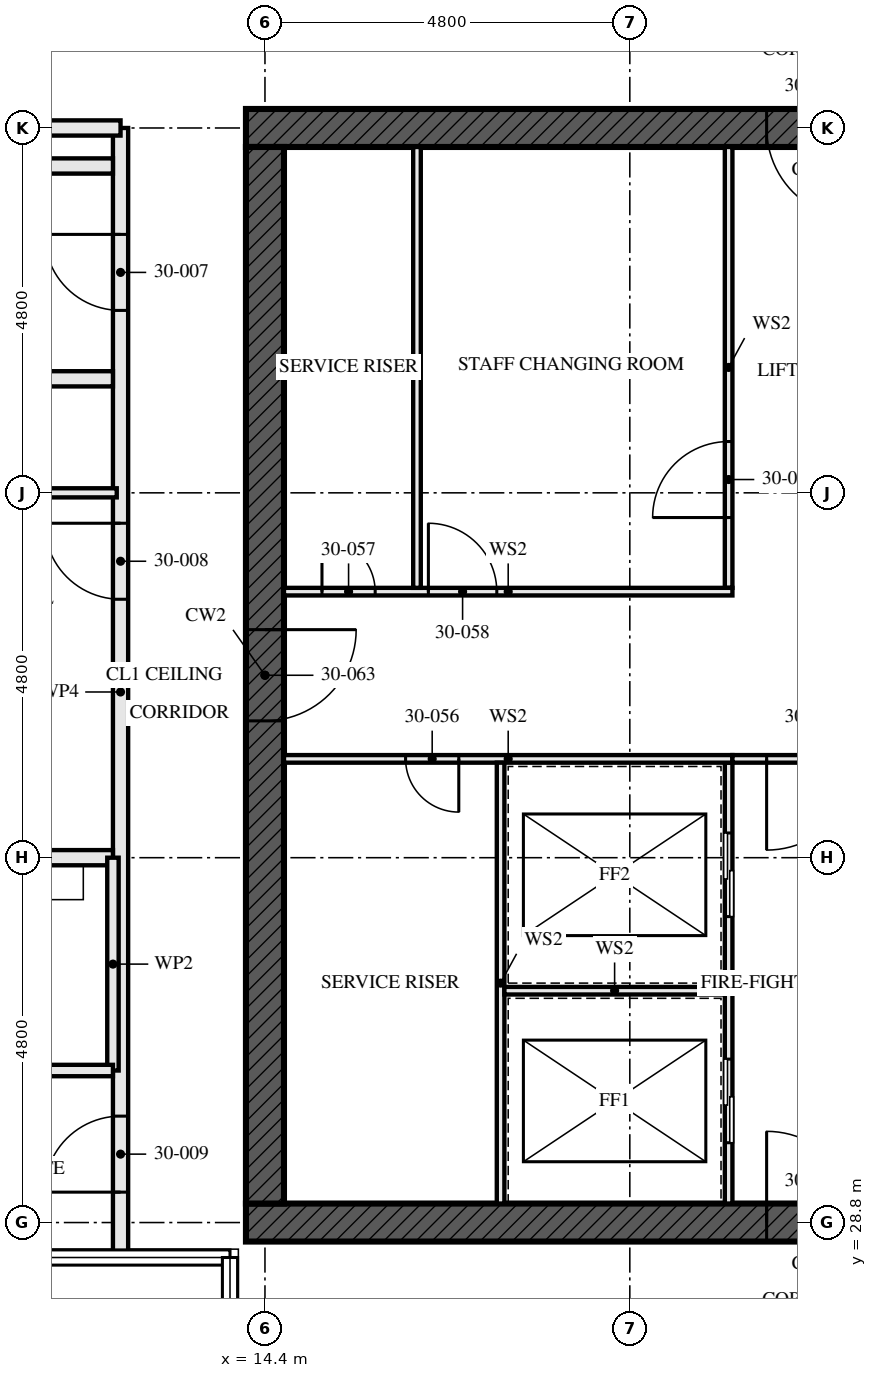
"""IFC4 building model, lengths in metres.
Left out: names, types, materials, properties, quantities, classifications, styles, units other than length and angle.
Written with IfcOpenShell. Run it as: python <this file> out.ifc"""

import sys

from ifc_helpers import new_model, si_unit, direction, frame, frame_2d, origin, place, context, subcontext, project, spatial, rectangle, extrude, element, fill, save


model = new_model("IFC4")
c1 = context("Model", 3, precision=1e-05, world=origin(), true_north=direction((0.0, 1.0)))
c2 = subcontext(c1, "Body", "Model", "MODEL_VIEW")
j1 = project(units=[si_unit("LENGTHUNIT", "METRE"), si_unit("PLANEANGLEUNIT", "RADIAN")], contexts=[c1])
p1 = place(None, origin())
s1 = spatial("IfcSite", under=j1, at=p1, CompositionType="ELEMENT")
p2 = place(p1, origin())
s2 = spatial("IfcBuilding", under=s1, at=p2, CompositionType="ELEMENT")
p3 = place(p2, frame((0.0, 0.0, 112.0)))
s3 = spatial("IfcBuildingStorey", under=s2, at=p3, CompositionType="ELEMENT", Elevation=112.0)
p4 = place(p3, frame((14.15, 28.8, -0.17), z_axis=(0.0, 0.0, 1.0), x_axis=(1.0, 0.0, 0.0)))
e1 = element("IfcWall", 1, at=p4, inside=s3, PredefinedType="SHEAR", context=c2, shape_type="SweptSolid", body=[
    extrude(rectangle(XDim=14.9, YDim=0.5, at=frame_2d((7.45, 0.0))), origin(), (0.0, 0.0, 1.0), 3.5),
])
p5 = place(p4, frame((6.85, 0.0, 0.17)))
e2 = element("IfcOpeningElement", 2, at=p5, cuts=e1, PredefinedType="OPENING", context=c2, shape_type="SweptSolid", body=[
    extrude(rectangle(XDim=1.2, YDim=2.1, at=frame_2d((0.6, 1.05))), frame((0.0, 0.26, 0.0), z_axis=(0.0, -1.0, 0.0), x_axis=(1.0, 0.0, 0.0)), (0.0, 0.0, 1.0), 0.521),
])
p6 = place(p3, frame((29.05, 43.2, -0.17), z_axis=(0.0, 0.0, 1.0), x_axis=(-1.0, 0.0, 0.0)))
e3 = element("IfcWall", 3, at=p6, inside=s3, PredefinedType="SHEAR", context=c2, shape_type="SweptSolid", body=[
    extrude(rectangle(XDim=14.9, YDim=0.5, at=frame_2d((7.45, 0.0))), origin(), (0.0, 0.0, 1.0), 3.5),
])
p7 = place(p6, frame((6.85, 0.0, 0.17)))
e4 = element("IfcOpeningElement", 4, at=p7, cuts=e3, PredefinedType="OPENING", context=c2, shape_type="SweptSolid", body=[
    extrude(rectangle(XDim=1.2, YDim=2.1, at=frame_2d((0.6, 1.05))), frame((0.0, 0.26, 0.0), z_axis=(0.0, -1.0, 0.0), x_axis=(1.0, 0.0, 0.0)), (0.0, 0.0, 1.0), 0.521),
])
p8 = place(p3, frame((14.4, 42.95, -0.17), z_axis=(0.0, 0.0, 1.0), x_axis=(0.0, -1.0, 0.0)))
e5 = element("IfcWall", 5, at=p8, inside=s3, PredefinedType="SHEAR", context=c2, shape_type="SweptSolid", body=[
    extrude(rectangle(XDim=13.9, YDim=0.5, at=frame_2d((6.95, 0.0))), origin(), (0.0, 0.0, 1.0), 3.5),
])
p9 = place(p8, frame((6.35, 0.0, 0.17)))
e6 = element("IfcOpeningElement", 6, at=p9, cuts=e5, PredefinedType="OPENING", context=c2, shape_type="SweptSolid", body=[
    extrude(rectangle(XDim=1.2, YDim=2.1, at=frame_2d((0.6, 1.05))), frame((0.0, 0.26, 0.0), z_axis=(0.0, -1.0, 0.0), x_axis=(1.0, 0.0, 0.0)), (0.0, 0.0, 1.0), 0.521),
])
for number, where, z_axis, x_axis in (
    (7, (7.7, 42.7, 0.0), (0.0, 0.0, 1.0), (1.0, 0.0, 0.0)),
    (8, (7.7, 39.9, 0.0), (0.0, 0.0, 1.0), (1.0, 0.0, 0.0)),
):
    element("IfcWall", number, at=place(p3, frame(where, z_axis=z_axis, x_axis=x_axis)), inside=s3, PredefinedType="SOLIDWALL", context=c2, shape_type="SweptSolid", body=[
        extrude(rectangle(XDim=4.7, YDim=0.2, at=frame_2d((2.35, 0.0))), origin(), (0.0, 0.0, 1.0), 2.99),
    ])
p10 = place(p3, frame((6.4, 38.4, 0.0), z_axis=(0.0, 0.0, 1.0), x_axis=(1.0, 0.0, 0.0)))
e9 = element("IfcWall", 9, at=p10, inside=s3, PredefinedType="PARTITIONING", context=c2, shape_type="SweptSolid", body=[
    extrude(rectangle(XDim=6.05, YDim=0.12, at=frame_2d((3.025, 0.0))), origin(), (0.0, 0.0, 1.0), 2.55),
])
p11 = place(p10, frame((4.05, 0.0, 0.0)))
e10 = element("IfcOpeningElement", 10, at=p11, cuts=e9, PredefinedType="OPENING", context=c2, shape_type="SweptSolid", body=[
    extrude(rectangle(XDim=0.9, YDim=2.1, at=frame_2d((0.45, 1.05))), frame((0.0, 0.071, 0.0), z_axis=(0.0, -1.0, 0.0), x_axis=(1.0, 0.0, 0.0)), (0.0, 0.0, 1.0), 0.141),
])
p12 = place(p3, frame((5.12, 33.6, 0.0), z_axis=(0.0, 0.0, 1.0), x_axis=(1.0, 0.0, 0.0)))
e11 = element("IfcWall", 11, at=p12, inside=s3, PredefinedType="PARTITIONING", context=c2, shape_type="SweptSolid", body=[
    extrude(rectangle(XDim=7.28, YDim=0.2, at=frame_2d((3.64, 0.0))), origin(), (0.0, 0.0, 1.0), 2.55),
])
p13 = place(p3, frame((9.4, 30.8, 0.0), z_axis=(0.0, 0.0, 1.0), x_axis=(1.0, 0.0, 0.0)))
e12 = element("IfcWall", 12, at=p13, inside=s3, PredefinedType="PARTITIONING", context=c2, shape_type="SweptSolid", body=[
    extrude(rectangle(XDim=3.0, YDim=0.15, at=frame_2d((1.5, 0.0))), origin(), (0.0, 0.0, 1.0), 3.33),
])
p14 = place(p3, frame((12.4, 33.6, 0.0), z_axis=(0.0, 0.0, 1.0), x_axis=(0.0, -1.0, 0.0)))
e13 = element("IfcWall", 13, at=p14, inside=s3, PredefinedType="PARTITIONING", context=c2, shape_type="SweptSolid", body=[
    extrude(rectangle(XDim=2.8, YDim=0.15, at=frame_2d((1.4, 0.0))), origin(), (0.0, 0.0, 1.0), 3.33),
])
p15 = place(p3, frame((12.5, 43.2, 0.0), z_axis=(0.0, 0.0, 1.0), x_axis=(0.0, -1.0, 0.0)))
e14 = element("IfcWall", 14, at=p15, inside=s3, PredefinedType="PARTITIONING", context=c2, shape_type="SweptSolid", body=[
    extrude(rectangle(XDim=14.84, YDim=0.2, at=frame_2d((7.42, 0.0))), origin(), (0.0, 0.0, 1.0), 2.32),
])
p16 = place(p15, frame((1.4, 0.0, 0.0)))
e15 = element("IfcOpeningElement", 15, at=p16, cuts=e14, PredefinedType="OPENING", context=c2, shape_type="SweptSolid", body=[
    extrude(rectangle(XDim=1.0, YDim=2.1, at=frame_2d((0.5, 1.05))), frame((0.0, 0.111, 0.0), z_axis=(0.0, -1.0, 0.0), x_axis=(1.0, 0.0, 0.0)), (0.0, 0.0, 1.0), 0.221),
])
p17 = place(p15, frame((5.2, 0.0, 0.0)))
e16 = element("IfcOpeningElement", 16, at=p17, cuts=e14, PredefinedType="OPENING", context=c2, shape_type="SweptSolid", body=[
    extrude(rectangle(XDim=1.0, YDim=2.1, at=frame_2d((0.5, 1.05))), frame((0.0, 0.111, 0.0), z_axis=(0.0, -1.0, 0.0), x_axis=(1.0, 0.0, 0.0)), (0.0, 0.0, 1.0), 0.221),
])
p18 = place(p15, frame((13.0, 0.0, 0.0)))
e17 = element("IfcOpeningElement", 17, at=p18, cuts=e14, PredefinedType="OPENING", context=c2, shape_type="SweptSolid", body=[
    extrude(rectangle(XDim=1.0, YDim=2.1, at=frame_2d((0.5, 1.05))), frame((0.0, 0.111, 0.0), z_axis=(0.0, -1.0, 0.0), x_axis=(1.0, 0.0, 0.0)), (0.0, 0.0, 1.0), 0.221),
])
p19 = place(p3, frame((16.4, 37.15, 0.0), z_axis=(0.0, 0.0, 1.0), x_axis=(0.0, 1.0, 0.0)))
e18 = element("IfcWall", 18, at=p19, inside=s3, PredefinedType="SOLIDWALL", context=c2, shape_type="SweptSolid", body=[
    extrude(rectangle(XDim=5.8, YDim=0.1, at=frame_2d((2.9, 0.0))), origin(), (0.0, 0.0, 1.0), 3.33),
])
p20 = place(p3, frame((20.5, 29.05, 0.0), z_axis=(0.0, 0.0, 1.0), x_axis=(0.0, 1.0, 0.0)))
e19 = element("IfcWall", 19, at=p20, inside=s3, PredefinedType="SOLIDWALL", context=c2, shape_type="SweptSolid", body=[
    extrude(rectangle(XDim=5.8, YDim=0.1, at=frame_2d((2.9, 0.0))), origin(), (0.0, 0.0, 1.0), 3.33),
])
p21 = place(p20, frame((0.8, 0.0, 0.0)))
e20 = element("IfcOpeningElement", 20, at=p21, cuts=e19, PredefinedType="OPENING", context=c2, shape_type="SweptSolid", body=[
    extrude(rectangle(XDim=1.1, YDim=2.3, at=frame_2d((0.55, 1.15))), frame((0.0, 0.061, 0.0), z_axis=(0.0, -1.0, 0.0), x_axis=(1.0, 0.0, 0.0)), (0.0, 0.0, 1.0), 0.121),
])
p22 = place(p20, frame((3.775, 0.0, 0.0)))
e21 = element("IfcOpeningElement", 21, at=p22, cuts=e19, PredefinedType="OPENING", context=c2, shape_type="SweptSolid", body=[
    extrude(rectangle(XDim=1.1, YDim=2.3, at=frame_2d((0.55, 1.15))), frame((0.0, 0.061, 0.0), z_axis=(0.0, -1.0, 0.0), x_axis=(1.0, 0.0, 0.0)), (0.0, 0.0, 1.0), 0.121),
])
p23 = place(p3, frame((20.5, 37.15, 0.0), z_axis=(0.0, 0.0, 1.0), x_axis=(0.0, 1.0, 0.0)))
e22 = element("IfcWall", 22, at=p23, inside=s3, PredefinedType="SOLIDWALL", context=c2, shape_type="SweptSolid", body=[
    extrude(rectangle(XDim=5.8, YDim=0.1, at=frame_2d((2.9, 0.0))), origin(), (0.0, 0.0, 1.0), 3.33),
])
p24 = place(p23, frame((0.925, 0.0, 0.0)))
e23 = element("IfcOpeningElement", 23, at=p24, cuts=e22, PredefinedType="OPENING", context=c2, shape_type="SweptSolid", body=[
    extrude(rectangle(XDim=1.0, YDim=2.1, at=frame_2d((0.5, 1.05))), frame((0.0, 0.061, 0.0), z_axis=(0.0, -1.0, 0.0), x_axis=(1.0, 0.0, 0.0)), (0.0, 0.0, 1.0), 0.121),
])
p25 = place(p3, frame((14.65, 34.9, 0.0), z_axis=(0.0, 0.0, 1.0), x_axis=(1.0, 0.0, 0.0)))
e24 = element("IfcWall", 24, at=p25, inside=s3, PredefinedType="SOLIDWALL", context=c2, shape_type="SweptSolid", body=[
    extrude(rectangle(XDim=5.9, YDim=0.1, at=frame_2d((2.95, 0.0))), origin(), (0.0, 0.0, 1.0), 3.33),
])
p26 = place(p25, frame((1.6, 0.0, 0.0)))
e25 = element("IfcOpeningElement", 25, at=p26, cuts=e24, PredefinedType="OPENING", context=c2, shape_type="SweptSolid", body=[
    extrude(rectangle(XDim=0.7, YDim=2.1, at=frame_2d((0.35, 1.05))), frame((0.0, 0.061, 0.0), z_axis=(0.0, -1.0, 0.0), x_axis=(1.0, 0.0, 0.0)), (0.0, 0.0, 1.0), 0.121),
])
p27 = place(p3, frame((14.65, 37.1, 0.0), z_axis=(0.0, 0.0, 1.0), x_axis=(1.0, 0.0, 0.0)))
e26 = element("IfcWall", 26, at=p27, inside=s3, PredefinedType="SOLIDWALL", context=c2, shape_type="SweptSolid", body=[
    extrude(rectangle(XDim=5.9, YDim=0.1, at=frame_2d((2.95, 0.0))), origin(), (0.0, 0.0, 1.0), 3.33),
])
p28 = place(p27, frame((0.5, 0.0, 0.0)))
e27 = element("IfcOpeningElement", 27, at=p28, cuts=e26, PredefinedType="OPENING", context=c2, shape_type="SweptSolid", body=[
    extrude(rectangle(XDim=0.7, YDim=2.1, at=frame_2d((0.35, 1.05))), frame((0.0, 0.061, 0.0), z_axis=(0.0, -1.0, 0.0), x_axis=(1.0, 0.0, 0.0)), (0.0, 0.0, 1.0), 0.121),
])
p29 = place(p27, frame((1.9, 0.0, 0.0)))
e28 = element("IfcOpeningElement", 28, at=p29, cuts=e26, PredefinedType="OPENING", context=c2, shape_type="SweptSolid", body=[
    extrude(rectangle(XDim=0.9, YDim=2.1, at=frame_2d((0.45, 1.05))), frame((0.0, 0.061, 0.0), z_axis=(0.0, -1.0, 0.0), x_axis=(1.0, 0.0, 0.0)), (0.0, 0.0, 1.0), 0.121),
])
p30 = place(p3, frame((20.55, 34.9, 0.0), z_axis=(0.0, 0.0, 1.0), x_axis=(1.0, 0.0, 0.0)))
e29 = element("IfcWall", 29, at=p30, inside=s3, PredefinedType="SOLIDWALL", context=c2, shape_type="SweptSolid", body=[
    extrude(rectangle(XDim=2.5, YDim=0.1, at=frame_2d((1.25, 0.0))), origin(), (0.0, 0.0, 1.0), 3.33),
])
p31 = place(p30, frame((0.45, 0.0, 0.0)))
e30 = element("IfcOpeningElement", 30, at=p31, cuts=e29, PredefinedType="OPENING", context=c2, shape_type="SweptSolid", body=[
    extrude(rectangle(XDim=1.2, YDim=2.1, at=frame_2d((0.6, 1.05))), frame((0.0, 0.061, 0.0), z_axis=(0.0, -1.0, 0.0), x_axis=(1.0, 0.0, 0.0)), (0.0, 0.0, 1.0), 0.121),
])
p32 = place(p3, frame((17.5, 29.05, 0.0), z_axis=(0.0, 0.0, 1.0), x_axis=(0.0, 1.0, 0.0)))
e31 = element("IfcWall", 31, at=p32, inside=s3, PredefinedType="SOLIDWALL", context=c2, shape_type="SweptSolid", body=[
    extrude(rectangle(XDim=5.8, YDim=0.1, at=frame_2d((2.9, 0.0))), origin(), (0.0, 0.0, 1.0), 3.33),
])
p33 = place(p3, frame((17.55, 31.85, 0.0), z_axis=(0.0, 0.0, 1.0), x_axis=(1.0, 0.0, 0.0)))
e32 = element("IfcWall", 32, at=p33, inside=s3, PredefinedType="SOLIDWALL", context=c2, shape_type="SweptSolid", body=[
    extrude(rectangle(XDim=2.9, YDim=0.1, at=frame_2d((1.45, 0.0))), origin(), (0.0, 0.0, 1.0), 3.33),
])
p34 = place(p3, frame((12.5, 43.2, 0.0), z_axis=(0.0, 0.0, 1.0), x_axis=(-1.0, 0.0, 0.0)))
e33 = element("IfcWall", 33, at=p34, inside=s3, PredefinedType="PARTITIONING", context=c2, shape_type="SweptSolid", body=[
    extrude(rectangle(XDim=2.555, YDim=0.2, at=frame_2d((1.277, 0.0))), origin(), (0.0, 0.0, 1.0), 2.32),
])
p35 = place(p16, frame((1.0, 0.0, 0.0), z_axis=(0.0, 0.0, 1.0), x_axis=(-1.0, 0.0, 0.0)))
e34 = element("IfcDoor", 34, at=p35, inside=s3, OperationType="SINGLE_SWING_LEFT", PredefinedType="DOOR", context=c2, shape_type="SweptSolid", body=[
    extrude(rectangle(XDim=1.0, YDim=2.1, at=frame_2d((0.5, 1.05))), frame((0.0, 0.032, 0.0), z_axis=(0.0, -1.0, 0.0), x_axis=(1.0, 0.0, 0.0)), (0.0, 0.0, 1.0), 0.064),
])
fill(e15, e34)
p36 = place(p17, frame((1.0, 0.0, 0.0), z_axis=(0.0, 0.0, 1.0), x_axis=(-1.0, 0.0, 0.0)))
e35 = element("IfcDoor", 35, at=p36, inside=s3, OperationType="SINGLE_SWING_LEFT", PredefinedType="DOOR", context=c2, shape_type="SweptSolid", body=[
    extrude(rectangle(XDim=1.0, YDim=2.1, at=frame_2d((0.5, 1.05))), frame((0.0, 0.027, 0.0), z_axis=(0.0, -1.0, 0.0), x_axis=(1.0, 0.0, 0.0)), (0.0, 0.0, 1.0), 0.054),
])
fill(e16, e35)
p37 = place(p18, frame((1.0, 0.0, 0.0), z_axis=(0.0, 0.0, 1.0), x_axis=(-1.0, 0.0, 0.0)))
e36 = element("IfcDoor", 36, at=p37, inside=s3, OperationType="SINGLE_SWING_RIGHT", PredefinedType="DOOR", context=c2, shape_type="SweptSolid", body=[
    extrude(rectangle(XDim=1.0, YDim=2.1, at=frame_2d((0.5, 1.05))), frame((0.0, 0.027, 0.0), z_axis=(0.0, -1.0, 0.0), x_axis=(1.0, 0.0, 0.0)), (0.0, 0.0, 1.0), 0.054),
])
fill(e17, e36)
p38 = place(p21, origin())
e37 = element("IfcDoor", 37, at=p38, inside=s3, OperationType="SLIDING_TO_LEFT", PredefinedType="DOOR", context=c2, shape_type="SweptSolid", body=[
    extrude(rectangle(XDim=1.1, YDim=2.3, at=frame_2d((0.55, 1.15))), frame((0.0, 0.05, 0.0), z_axis=(0.0, -1.0, 0.0), x_axis=(1.0, 0.0, 0.0)), (0.0, 0.0, 1.0), 0.1),
])
fill(e20, e37)
p39 = place(p22, origin())
e38 = element("IfcDoor", 38, at=p39, inside=s3, OperationType="SLIDING_TO_LEFT", PredefinedType="DOOR", context=c2, shape_type="SweptSolid", body=[
    extrude(rectangle(XDim=1.1, YDim=2.3, at=frame_2d((0.55, 1.15))), frame((0.0, 0.05, 0.0), z_axis=(0.0, -1.0, 0.0), x_axis=(1.0, 0.0, 0.0)), (0.0, 0.0, 1.0), 0.1),
])
fill(e21, e38)
p40 = place(p24, origin())
e39 = element("IfcDoor", 39, at=p40, inside=s3, OperationType="SINGLE_SWING_RIGHT", PredefinedType="DOOR", context=c2, shape_type="SweptSolid", body=[
    extrude(rectangle(XDim=1.0, YDim=2.1, at=frame_2d((0.5, 1.05))), frame((0.0, 0.027, 0.0), z_axis=(0.0, -1.0, 0.0), x_axis=(1.0, 0.0, 0.0)), (0.0, 0.0, 1.0), 0.054),
])
fill(e23, e39)
p41 = place(p26, frame((0.7, 0.0, 0.0), z_axis=(0.0, 0.0, 1.0), x_axis=(-1.0, 0.0, 0.0)))
e40 = element("IfcDoor", 40, at=p41, inside=s3, OperationType="SINGLE_SWING_RIGHT", PredefinedType="DOOR", context=c2, shape_type="SweptSolid", body=[
    extrude(rectangle(XDim=0.7, YDim=2.1, at=frame_2d((0.35, 1.05))), frame((0.0, 0.027, 0.0), z_axis=(0.0, -1.0, 0.0), x_axis=(1.0, 0.0, 0.0)), (0.0, 0.0, 1.0), 0.054),
])
fill(e25, e40)
p42 = place(p28, origin())
e41 = element("IfcDoor", 41, at=p42, inside=s3, OperationType="SINGLE_SWING_RIGHT", PredefinedType="DOOR", context=c2, shape_type="SweptSolid", body=[
    extrude(rectangle(XDim=0.7, YDim=2.1, at=frame_2d((0.35, 1.05))), frame((0.0, 0.027, 0.0), z_axis=(0.0, -1.0, 0.0), x_axis=(1.0, 0.0, 0.0)), (0.0, 0.0, 1.0), 0.054),
])
fill(e27, e41)
p43 = place(p29, origin())
e42 = element("IfcDoor", 42, at=p43, inside=s3, OperationType="SINGLE_SWING_RIGHT", PredefinedType="DOOR", context=c2, shape_type="SweptSolid", body=[
    extrude(rectangle(XDim=0.9, YDim=2.1, at=frame_2d((0.45, 1.05))), frame((0.0, 0.027, 0.0), z_axis=(0.0, -1.0, 0.0), x_axis=(1.0, 0.0, 0.0)), (0.0, 0.0, 1.0), 0.054),
])
fill(e28, e42)
p44 = place(p31, frame((1.2, 0.0, 0.0), z_axis=(0.0, 0.0, 1.0), x_axis=(-1.0, 0.0, 0.0)))
e43 = element("IfcDoor", 43, at=p44, inside=s3, OperationType="SINGLE_SWING_LEFT", PredefinedType="DOOR", context=c2, shape_type="SweptSolid", body=[
    extrude(rectangle(XDim=1.2, YDim=2.1, at=frame_2d((0.6, 1.05))), frame((0.0, 0.027, 0.0), z_axis=(0.0, -1.0, 0.0), x_axis=(1.0, 0.0, 0.0)), (0.0, 0.0, 1.0), 0.054),
])
fill(e30, e43)
p45 = place(p5, origin())
e44 = element("IfcDoor", 44, at=p45, inside=s3, OperationType="SINGLE_SWING_LEFT", PredefinedType="DOOR", context=c2, shape_type="SweptSolid", body=[
    extrude(rectangle(XDim=1.2, YDim=2.1, at=frame_2d((0.6, 1.05))), frame((0.0, 0.027, 0.0), z_axis=(0.0, -1.0, 0.0), x_axis=(1.0, 0.0, 0.0)), (0.0, 0.0, 1.0), 0.054),
])
fill(e2, e44)
p46 = place(p9, origin())
e45 = element("IfcDoor", 45, at=p46, inside=s3, OperationType="SINGLE_SWING_LEFT", PredefinedType="DOOR", context=c2, shape_type="SweptSolid", body=[
    extrude(rectangle(XDim=1.2, YDim=2.1, at=frame_2d((0.6, 1.05))), frame((0.0, 0.027, 0.0), z_axis=(0.0, -1.0, 0.0), x_axis=(1.0, 0.0, 0.0)), (0.0, 0.0, 1.0), 0.054),
])
fill(e6, e45)
p47 = place(p7, origin())
e46 = element("IfcDoor", 46, at=p47, inside=s3, OperationType="SINGLE_SWING_LEFT", PredefinedType="DOOR", context=c2, shape_type="SweptSolid", body=[
    extrude(rectangle(XDim=1.2, YDim=2.1, at=frame_2d((0.6, 1.05))), frame((0.0, 0.027, 0.0), z_axis=(0.0, -1.0, 0.0), x_axis=(1.0, 0.0, 0.0)), (0.0, 0.0, 1.0), 0.054),
])
fill(e4, e46)
save(model, sys.argv[1])
